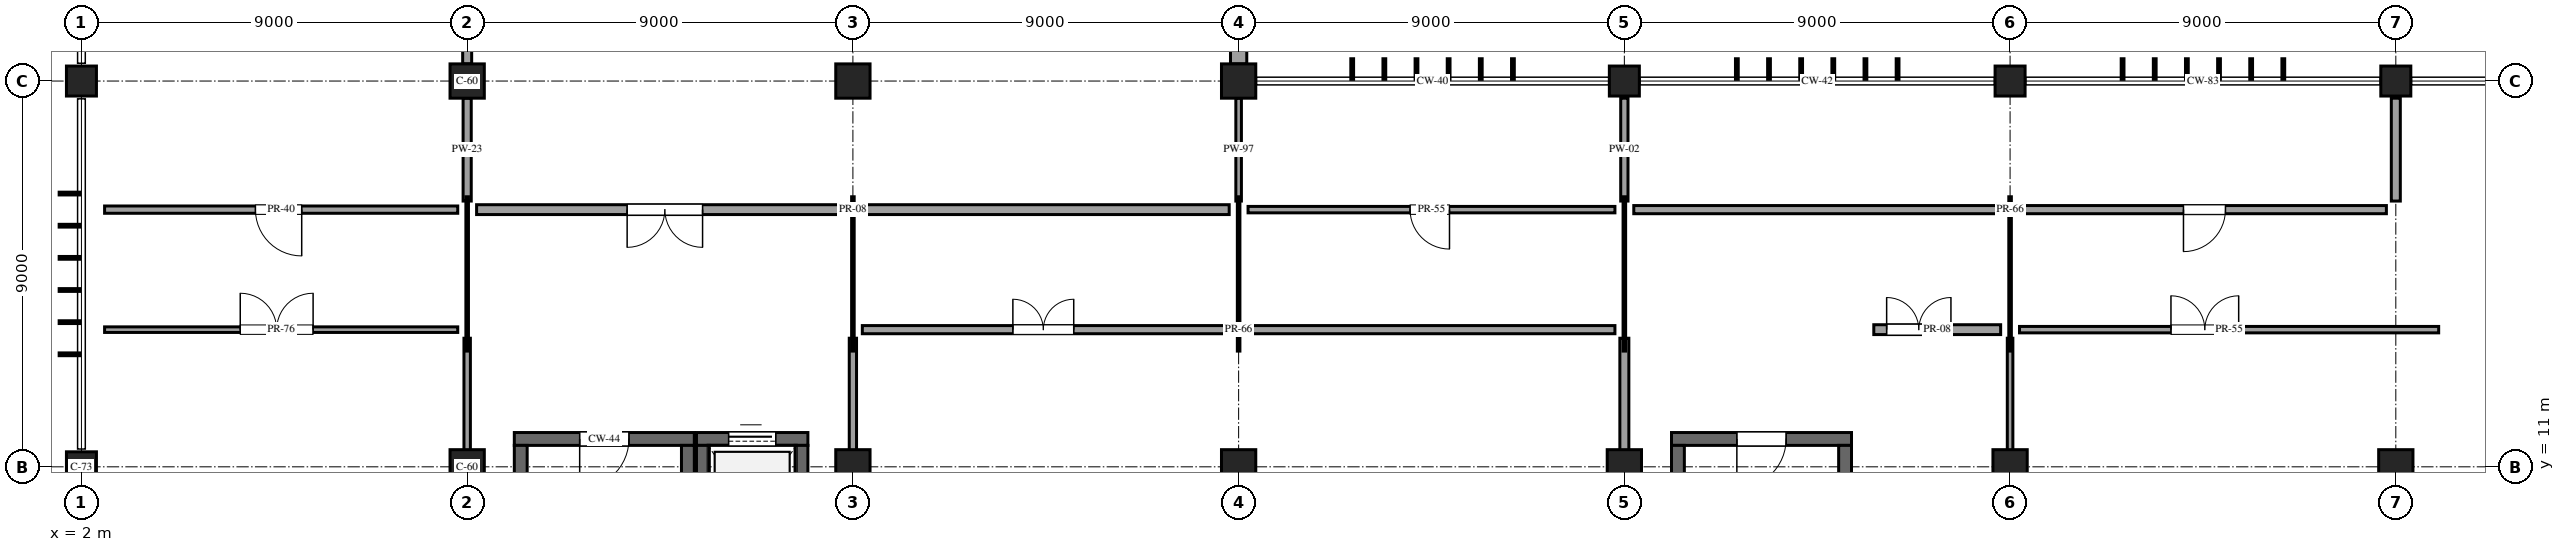
"""IFC4 building model, lengths in metres.
Left out: names, types, materials, properties, quantities, classifications, styles, units other than length and angle.
Written with IfcOpenShell. Run it as: python <this file> out.ifc"""

import sys

from ifc_helpers import new_model, si_unit, direction, frame, frame_2d, origin, origin_2d, place, context, subcontext, project, spatial, rectangle, circle, extrude, element, fill, save


model = new_model("IFC4")
c1 = context("Model", 3, precision=1e-05, world=origin(), true_north=direction((0.0, 1.0)))
c2 = subcontext(c1, "Body", "Model", "MODEL_VIEW")
j1 = project(units=[si_unit("LENGTHUNIT", "METRE"), si_unit("PLANEANGLEUNIT", "RADIAN")], contexts=[c1])
p1 = place(None, origin())
s1 = spatial("IfcSite", under=j1, at=p1, CompositionType="ELEMENT")
p2 = place(p1, origin())
s2 = spatial("IfcBuilding", under=s1, at=p2, CompositionType="ELEMENT")
p3 = place(p2, frame((0.0, 0.0, 5.4)))
s3 = spatial("IfcBuildingStorey", under=s2, at=p3, CompositionType="ELEMENT", Elevation=5.4)
for number, where, z_axis, x_axis in (
    (1, (2.0, 11.0, 0.0), (0.0, 0.0, 1.0), (1.0, 0.0, 0.0)),
    (2, (2.0, 20.0, 0.0), (0.0, 0.0, 1.0), (1.0, 0.0, 0.0)),
):
    element("IfcColumn", number, at=place(p3, frame(where, z_axis=z_axis, x_axis=x_axis)), inside=s3, PredefinedType="COLUMN", context=c2, shape_type="SweptSolid", body=[
        extrude(rectangle(XDim=0.7, YDim=0.7, at=origin_2d()), origin(), (0.0, 0.0, 1.0), 4.8),
    ])
for number, where, z_axis, x_axis in (
    (3, (11.0, 11.0, 0.0), (0.0, 0.0, 1.0), (1.0, 0.0, 0.0)),
    (4, (11.0, 20.0, 0.0), (0.0, 0.0, 1.0), (1.0, 0.0, 0.0)),
    (5, (20.0, 11.0, 0.0), (0.0, 0.0, 1.0), (1.0, 0.0, 0.0)),
    (6, (20.0, 20.0, 0.0), (0.0, 0.0, 1.0), (1.0, 0.0, 0.0)),
    (7, (29.0, 11.0, 0.0), (0.0, 0.0, 1.0), (1.0, 0.0, 0.0)),
    (8, (29.0, 20.0, 0.0), (0.0, 0.0, 1.0), (1.0, 0.0, 0.0)),
    (9, (38.0, 11.0, 0.0), (0.0, 0.0, 1.0), (1.0, 0.0, 0.0)),
):
    element("IfcColumn", number, at=place(p3, frame(where, z_axis=z_axis, x_axis=x_axis)), inside=s3, PredefinedType="COLUMN", context=c2, shape_type="SweptSolid", body=[
        extrude(circle(Radius=0.4, at=origin_2d()), origin(), (0.0, 0.0, 1.0), 4.8),
    ])
p4 = place(p3, frame((38.0, 20.0, 0.0), z_axis=(0.0, 0.0, 1.0), x_axis=(1.0, 0.0, 0.0)))
e10 = element("IfcColumn", 10, at=p4, inside=s3, PredefinedType="COLUMN", context=c2, shape_type="SweptSolid", body=[
    extrude(rectangle(XDim=0.7, YDim=0.7, at=origin_2d()), origin(), (0.0, 0.0, 1.0), 4.8),
])
p5 = place(p3, frame((47.0, 11.0, 0.0), z_axis=(0.0, 0.0, 1.0), x_axis=(1.0, 0.0, 0.0)))
e11 = element("IfcColumn", 11, at=p5, inside=s3, PredefinedType="COLUMN", context=c2, shape_type="SweptSolid", body=[
    extrude(circle(Radius=0.4, at=origin_2d()), origin(), (0.0, 0.0, 1.0), 4.8),
])
p6 = place(p3, frame((47.0, 20.0, 0.0), z_axis=(0.0, 0.0, 1.0), x_axis=(1.0, 0.0, 0.0)))
e12 = element("IfcColumn", 12, at=p6, inside=s3, PredefinedType="COLUMN", context=c2, shape_type="SweptSolid", body=[
    extrude(rectangle(XDim=0.7, YDim=0.7, at=origin_2d()), origin(), (0.0, 0.0, 1.0), 4.8),
])
p7 = place(p3, frame((56.0, 11.0, 0.0), z_axis=(0.0, 0.0, 1.0), x_axis=(1.0, 0.0, 0.0)))
e13 = element("IfcColumn", 13, at=p7, inside=s3, PredefinedType="COLUMN", context=c2, shape_type="SweptSolid", body=[
    extrude(circle(Radius=0.4, at=origin_2d()), origin(), (0.0, 0.0, 1.0), 4.8),
])
p8 = place(p3, frame((56.0, 20.0, 0.0), z_axis=(0.0, 0.0, 1.0), x_axis=(1.0, 0.0, 0.0)))
e14 = element("IfcColumn", 14, at=p8, inside=s3, PredefinedType="COLUMN", context=c2, shape_type="SweptSolid", body=[
    extrude(rectangle(XDim=0.7, YDim=0.7, at=origin_2d()), origin(), (0.0, 0.0, 1.0), 4.8),
])
p9 = place(p3, frame((29.0, 20.4, 0.0), z_axis=(0.0, 0.0, 1.0), x_axis=(0.0, 1.0, 0.0)))
e15 = element("IfcWall", 15, at=p9, inside=s3, PredefinedType="STANDARD", context=c2, shape_type="SweptSolid", body=[
    extrude(rectangle(XDim=8.45, YDim=0.38, at=frame_2d((4.225, 0.0))), origin(), (0.0, 0.0, 1.0), 3.575),
])
p10 = place(p3, frame((12.1, 11.65, 0.0), z_axis=(0.0, 0.0, 1.0), x_axis=(1.0, 0.0, 0.0)))
e16 = element("IfcWall", 16, at=p10, inside=s3, PredefinedType="SHEAR", context=c2, shape_type="SweptSolid", body=[
    extrude(rectangle(XDim=4.2, YDim=0.3, at=frame_2d((2.1, 0.0))), origin(), (0.0, 0.0, 1.0), 4.44),
])
p11 = place(p10, frame((2.675, 0.0, 0.0), z_axis=(0.0, 0.0, 1.0), x_axis=(-1.0, 0.0, 0.0)))
e17 = element("IfcOpeningElement", 17, at=p11, cuts=e16, PredefinedType="OPENING", context=c2, shape_type="SweptSolid", body=[
    extrude(rectangle(XDim=1.15, YDim=2.2, at=frame_2d((0.575, 1.1))), frame((0.0, 0.16, 0.0), z_axis=(0.0, -1.0, 0.0), x_axis=(1.0, 0.0, 0.0)), (0.0, 0.0, 1.0), 0.32),
])
for number, where, z_axis, x_axis in (
    (18, (12.25, 2.85, 0.0), (0.0, 0.0, 1.0), (0.0, 1.0, 0.0)),
    (19, (16.15, 2.85, 0.0), (0.0, 0.0, 1.0), (0.0, 1.0, 0.0)),
):
    element("IfcWall", number, at=place(p3, frame(where, z_axis=z_axis, x_axis=x_axis)), inside=s3, PredefinedType="SHEAR", context=c2, shape_type="SweptSolid", body=[
        extrude(rectangle(XDim=8.65, YDim=0.3, at=frame_2d((4.325, 0.0))), origin(), (0.0, 0.0, 1.0), 4.44),
    ])
p12 = place(p3, frame((16.35, 11.65, 0.0), z_axis=(0.0, 0.0, 1.0), x_axis=(1.0, 0.0, 0.0)))
e20 = element("IfcWall", 20, at=p12, inside=s3, PredefinedType="SHEAR", context=c2, shape_type="SweptSolid", body=[
    extrude(rectangle(XDim=2.6, YDim=0.3, at=frame_2d((1.3, 0.0))), origin(), (0.0, 0.0, 1.0), 4.44),
])
p13 = place(p12, frame((0.75, 0.0, 0.0)))
e21 = element("IfcOpeningElement", 21, at=p13, cuts=e20, PredefinedType="OPENING", context=c2, shape_type="SweptSolid", body=[
    extrude(rectangle(XDim=1.1, YDim=2.2, at=frame_2d((0.55, 1.1))), frame((0.0, 0.16, 0.0), z_axis=(0.0, -1.0, 0.0), x_axis=(1.0, 0.0, 0.0)), (0.0, 0.0, 1.0), 0.32),
])
for number, where, z_axis, x_axis in (
    (22, (18.8, 8.5, 0.0), (0.0, 0.0, 1.0), (0.0, 1.0, 0.0)),
    (23, (16.5, 8.5, 0.0), (0.0, 0.0, 1.0), (0.0, 1.0, 0.0)),
):
    element("IfcWall", number, at=place(p3, frame(where, z_axis=z_axis, x_axis=x_axis)), inside=s3, PredefinedType="SHEAR", context=c2, shape_type="SweptSolid", body=[
        extrude(rectangle(XDim=3.0, YDim=0.3, at=frame_2d((1.5, 0.0))), origin(), (0.0, 0.0, 1.0), 4.44),
    ])
p14 = place(p3, frame((39.1, 11.65, 0.0), z_axis=(0.0, 0.0, 1.0), x_axis=(1.0, 0.0, 0.0)))
e24 = element("IfcWall", 24, at=p14, inside=s3, PredefinedType="SHEAR", context=c2, shape_type="SweptSolid", body=[
    extrude(rectangle(XDim=4.2, YDim=0.3, at=frame_2d((2.1, 0.0))), origin(), (0.0, 0.0, 1.0), 4.44),
])
p15 = place(p14, frame((2.675, 0.0, 0.0), z_axis=(0.0, 0.0, 1.0), x_axis=(-1.0, 0.0, 0.0)))
e25 = element("IfcOpeningElement", 25, at=p15, cuts=e24, PredefinedType="OPENING", context=c2, shape_type="SweptSolid", body=[
    extrude(rectangle(XDim=1.15, YDim=2.2, at=frame_2d((0.575, 1.1))), frame((0.0, 0.16, 0.0), z_axis=(0.0, -1.0, 0.0), x_axis=(1.0, 0.0, 0.0)), (0.0, 0.0, 1.0), 0.32),
])
for number, where, z_axis, x_axis in (
    (26, (39.25, 2.85, 0.0), (0.0, 0.0, 1.0), (0.0, 1.0, 0.0)),
    (27, (43.15, 2.85, 0.0), (0.0, 0.0, 1.0), (0.0, 1.0, 0.0)),
):
    element("IfcWall", number, at=place(p3, frame(where, z_axis=z_axis, x_axis=x_axis)), inside=s3, PredefinedType="SHEAR", context=c2, shape_type="SweptSolid", body=[
        extrude(rectangle(XDim=8.65, YDim=0.3, at=frame_2d((4.325, 0.0))), origin(), (0.0, 0.0, 1.0), 4.44),
    ])
p16 = place(p3, frame((2.54, 14.2, 0.0), z_axis=(0.0, 0.0, 1.0), x_axis=(1.0, 0.0, 0.0)))
e28 = element("IfcWall", 28, at=p16, inside=s3, PredefinedType="PARTITIONING", context=c2, shape_type="SweptSolid", body=[
    extrude(rectangle(XDim=8.24, YDim=0.13, at=frame_2d((4.12, 0.0))), origin(), (0.0, 0.0, 1.0), 3.575),
])
p17 = place(p16, frame((3.165, 0.0, 0.0)))
e29 = element("IfcOpeningElement", 29, at=p17, cuts=e28, PredefinedType="OPENING", context=c2, shape_type="SweptSolid", body=[
    extrude(rectangle(XDim=1.7, YDim=2.44, at=frame_2d((0.85, 1.22))), frame((0.0, 0.075, 0.0), z_axis=(0.0, -1.0, 0.0), x_axis=(1.0, 0.0, 0.0)), (0.0, 0.0, 1.0), 0.15),
])
p18 = place(p3, frame((11.0, 2.4, 0.0), z_axis=(0.0, 0.0, 1.0), x_axis=(0.0, 1.0, 0.0)))
e30 = element("IfcWall", 30, at=p18, inside=s3, PredefinedType="PARTITIONING", context=c2, shape_type="SweptSolid", body=[
    extrude(rectangle(XDim=11.6, YDim=0.15, at=frame_2d((5.8, 0.0))), origin(), (0.0, 0.0, 1.0), 3.575),
])
p19 = place(p3, frame((20.0, 2.4, 0.0), z_axis=(0.0, 0.0, 1.0), x_axis=(0.0, 1.0, 0.0)))
e31 = element("IfcWall", 31, at=p19, inside=s3, PredefinedType="PARTITIONING", context=c2, shape_type="SweptSolid", body=[
    extrude(rectangle(XDim=11.6, YDim=0.17, at=frame_2d((5.8, 0.0))), origin(), (0.0, 0.0, 1.0), 3.575),
])
p20 = place(p3, frame((20.22, 14.2, 0.0), z_axis=(0.0, 0.0, 1.0), x_axis=(1.0, 0.0, 0.0)))
e32 = element("IfcWall", 32, at=p20, inside=s3, PredefinedType="PARTITIONING", context=c2, shape_type="SweptSolid", body=[
    extrude(rectangle(XDim=17.56, YDim=0.19, at=frame_2d((8.78, 0.0))), origin(), (0.0, 0.0, 1.0), 3.575),
])
p21 = place(p20, frame((3.512, 0.0, 0.0)))
e33 = element("IfcOpeningElement", 33, at=p21, cuts=e32, PredefinedType="OPENING", context=c2, shape_type="SweptSolid", body=[
    extrude(rectangle(XDim=1.42, YDim=2.3, at=frame_2d((0.71, 1.15))), frame((0.0, 0.105, 0.0), z_axis=(0.0, -1.0, 0.0), x_axis=(1.0, 0.0, 0.0)), (0.0, 0.0, 1.0), 0.21),
])
p22 = place(p3, frame((38.0, 2.4, 0.0), z_axis=(0.0, 0.0, 1.0), x_axis=(0.0, 1.0, 0.0)))
e34 = element("IfcWall", 34, at=p22, inside=s3, PredefinedType="PARTITIONING", context=c2, shape_type="SweptSolid", body=[
    extrude(rectangle(XDim=11.6, YDim=0.21, at=frame_2d((5.8, 0.0))), origin(), (0.0, 0.0, 1.0), 3.575),
])
p23 = place(p3, frame((43.82, 14.2, 0.0), z_axis=(0.0, 0.0, 1.0), x_axis=(1.0, 0.0, 0.0)))
e35 = element("IfcWall", 35, at=p23, inside=s3, PredefinedType="PARTITIONING", context=c2, shape_type="SweptSolid", body=[
    extrude(rectangle(XDim=2.96, YDim=0.23, at=frame_2d((1.48, 0.0))), origin(), (0.0, 0.0, 1.0), 3.575),
])
p24 = place(p23, frame((0.3, 0.0, 0.0)))
e36 = element("IfcOpeningElement", 36, at=p24, cuts=e35, PredefinedType="OPENING", context=c2, shape_type="SweptSolid", body=[
    extrude(rectangle(XDim=1.5, YDim=2.35, at=frame_2d((0.75, 1.175))), frame((0.0, 0.125, 0.0), z_axis=(0.0, -1.0, 0.0), x_axis=(1.0, 0.0, 0.0)), (0.0, 0.0, 1.0), 0.25),
])
p25 = place(p3, frame((47.0, 2.4, 0.0), z_axis=(0.0, 0.0, 1.0), x_axis=(0.0, 1.0, 0.0)))
e37 = element("IfcWall", 37, at=p25, inside=s3, PredefinedType="PARTITIONING", context=c2, shape_type="SweptSolid", body=[
    extrude(rectangle(XDim=11.6, YDim=0.13, at=frame_2d((5.8, 0.0))), origin(), (0.0, 0.0, 1.0), 3.575),
])
p26 = place(p3, frame((47.22, 14.2, 0.0), z_axis=(0.0, 0.0, 1.0), x_axis=(1.0, 0.0, 0.0)))
e38 = element("IfcWall", 38, at=p26, inside=s3, PredefinedType="PARTITIONING", context=c2, shape_type="SweptSolid", body=[
    extrude(rectangle(XDim=9.78, YDim=0.15, at=frame_2d((4.89, 0.0))), origin(), (0.0, 0.0, 1.0), 3.175),
])
p27 = place(p26, frame((3.534, 0.0, 0.0)))
e39 = element("IfcOpeningElement", 39, at=p27, cuts=e38, PredefinedType="OPENING", context=c2, shape_type="SweptSolid", body=[
    extrude(rectangle(XDim=1.58, YDim=2.38, at=frame_2d((0.79, 1.19))), frame((0.0, 0.085, 0.0), z_axis=(0.0, -1.0, 0.0), x_axis=(1.0, 0.0, 0.0)), (0.0, 0.0, 1.0), 0.17),
])
p28 = place(p3, frame((2.54, 17.0, 0.0), z_axis=(0.0, 0.0, 1.0), x_axis=(1.0, 0.0, 0.0)))
e40 = element("IfcWall", 40, at=p28, inside=s3, PredefinedType="PARTITIONING", context=c2, shape_type="SweptSolid", body=[
    extrude(rectangle(XDim=8.24, YDim=0.17, at=frame_2d((4.12, 0.0))), origin(), (0.0, 0.0, 1.0), 3.575),
])
p29 = place(p28, frame((4.599, 0.0, 0.0), z_axis=(0.0, 0.0, 1.0), x_axis=(-1.0, 0.0, 0.0)))
e41 = element("IfcOpeningElement", 41, at=p29, cuts=e40, PredefinedType="OPENING", context=c2, shape_type="SweptSolid", body=[
    extrude(rectangle(XDim=1.08, YDim=2.24, at=frame_2d((0.54, 1.12))), frame((0.0, 0.095, 0.0), z_axis=(0.0, -1.0, 0.0), x_axis=(1.0, 0.0, 0.0)), (0.0, 0.0, 1.0), 0.19),
])
p30 = place(p3, frame((11.0, 17.2, 0.0), z_axis=(0.0, 0.0, 1.0), x_axis=(0.0, 1.0, 0.0)))
e42 = element("IfcWall", 42, at=p30, inside=s3, PredefinedType="PARTITIONING", context=c2, shape_type="SweptSolid", body=[
    extrude(rectangle(XDim=2.4, YDim=0.19, at=frame_2d((1.2, 0.0))), origin(), (0.0, 0.0, 1.0), 3.575),
])
p31 = place(p3, frame((11.0, 20.4, 0.0), z_axis=(0.0, 0.0, 1.0), x_axis=(0.0, 1.0, 0.0)))
e43 = element("IfcWall", 43, at=p31, inside=s3, PredefinedType="PARTITIONING", context=c2, shape_type="SweptSolid", body=[
    extrude(rectangle(XDim=8.4, YDim=0.21, at=frame_2d((4.2, 0.0))), origin(), (0.0, 0.0, 1.0), 3.575),
])
p32 = place(p3, frame((11.22, 17.0, 0.0), z_axis=(0.0, 0.0, 1.0), x_axis=(1.0, 0.0, 0.0)))
e44 = element("IfcWall", 44, at=p32, inside=s3, PredefinedType="PARTITIONING", context=c2, shape_type="SweptSolid", body=[
    extrude(rectangle(XDim=17.56, YDim=0.23, at=frame_2d((8.78, 0.0))), origin(), (0.0, 0.0, 1.0), 3.575),
])
p33 = place(p32, frame((5.272, 0.0, 0.0), z_axis=(0.0, 0.0, 1.0), x_axis=(-1.0, 0.0, 0.0)))
e45 = element("IfcOpeningElement", 45, at=p33, cuts=e44, PredefinedType="OPENING", context=c2, shape_type="SweptSolid", body=[
    extrude(rectangle(XDim=1.76, YDim=2.45, at=frame_2d((0.88, 1.225))), frame((0.0, 0.125, 0.0), z_axis=(0.0, -1.0, 0.0), x_axis=(1.0, 0.0, 0.0)), (0.0, 0.0, 1.0), 0.25),
])
p34 = place(p3, frame((29.0, 17.2, 0.0), z_axis=(0.0, 0.0, 1.0), x_axis=(0.0, 1.0, 0.0)))
e46 = element("IfcWall", 46, at=p34, inside=s3, PredefinedType="PARTITIONING", context=c2, shape_type="SweptSolid", body=[
    extrude(rectangle(XDim=2.4, YDim=0.13, at=frame_2d((1.2, 0.0))), origin(), (0.0, 0.0, 1.0), 3.575),
])
p35 = place(p3, frame((29.22, 17.0, 0.0), z_axis=(0.0, 0.0, 1.0), x_axis=(1.0, 0.0, 0.0)))
e47 = element("IfcWall", 47, at=p35, inside=s3, PredefinedType="PARTITIONING", context=c2, shape_type="SweptSolid", body=[
    extrude(rectangle(XDim=8.56, YDim=0.15, at=frame_2d((4.28, 0.0))), origin(), (0.0, 0.0, 1.0), 3.575),
])
p36 = place(p35, frame((4.7, 0.0, 0.0), z_axis=(0.0, 0.0, 1.0), x_axis=(-1.0, 0.0, 0.0)))
e48 = element("IfcOpeningElement", 48, at=p36, cuts=e47, PredefinedType="OPENING", context=c2, shape_type="SweptSolid", body=[
    extrude(rectangle(XDim=0.92, YDim=2.12, at=frame_2d((0.46, 1.06))), frame((0.0, 0.085, 0.0), z_axis=(0.0, -1.0, 0.0), x_axis=(1.0, 0.0, 0.0)), (0.0, 0.0, 1.0), 0.17),
])
p37 = place(p3, frame((38.0, 17.2, 0.0), z_axis=(0.0, 0.0, 1.0), x_axis=(0.0, 1.0, 0.0)))
e49 = element("IfcWall", 49, at=p37, inside=s3, PredefinedType="PARTITIONING", context=c2, shape_type="SweptSolid", body=[
    extrude(rectangle(XDim=2.4, YDim=0.17, at=frame_2d((1.2, 0.0))), origin(), (0.0, 0.0, 1.0), 3.575),
])
p38 = place(p3, frame((38.22, 17.0, 0.0), z_axis=(0.0, 0.0, 1.0), x_axis=(1.0, 0.0, 0.0)))
e50 = element("IfcWall", 50, at=p38, inside=s3, PredefinedType="PARTITIONING", context=c2, shape_type="SweptSolid", body=[
    extrude(rectangle(XDim=17.56, YDim=0.19, at=frame_2d((8.78, 0.0))), origin(), (0.0, 0.0, 1.0), 3.175),
])
p39 = place(p38, frame((13.806, 0.0, 0.0), z_axis=(0.0, 0.0, 1.0), x_axis=(-1.0, 0.0, 0.0)))
e51 = element("IfcOpeningElement", 51, at=p39, cuts=e50, PredefinedType="OPENING", context=c2, shape_type="SweptSolid", body=[
    extrude(rectangle(XDim=0.98, YDim=2.18, at=frame_2d((0.49, 1.09))), frame((0.0, 0.105, 0.0), z_axis=(0.0, -1.0, 0.0), x_axis=(1.0, 0.0, 0.0)), (0.0, 0.0, 1.0), 0.21),
])
p40 = place(p3, frame((56.0, 17.2, 0.0), z_axis=(0.0, 0.0, 1.0), x_axis=(0.0, 1.0, 0.0)))
e52 = element("IfcWall", 52, at=p40, inside=s3, PredefinedType="PARTITIONING", context=c2, shape_type="SweptSolid", body=[
    extrude(rectangle(XDim=2.4, YDim=0.21, at=frame_2d((1.2, 0.0))), origin(), (0.0, 0.0, 1.0), 3.175),
])
p41 = place(p11, origin())
e53 = element("IfcDoor", 53, at=p41, inside=s3, OperationType="SINGLE_SWING_RIGHT", PredefinedType="DOOR", context=c2, shape_type="SweptSolid", body=[
    extrude(rectangle(XDim=1.15, YDim=2.2, at=frame_2d((0.575, 1.1))), frame((0.0, 0.025, 0.0), z_axis=(0.0, -1.0, 0.0), x_axis=(1.0, 0.0, 0.0)), (0.0, 0.0, 1.0), 0.05),
])
fill(e17, e53)
p42 = place(p13, origin())
e54 = element("IfcDoor", 54, at=p42, inside=s3, OperationType="SLIDING_TO_LEFT", PredefinedType="DOOR", context=c2, shape_type="SweptSolid", body=[
    extrude(rectangle(XDim=1.1, YDim=2.2, at=frame_2d((0.55, 1.1))), frame((0.0, 0.025, 0.0), z_axis=(0.0, -1.0, 0.0), x_axis=(1.0, 0.0, 0.0)), (0.0, 0.0, 1.0), 0.05),
])
fill(e21, e54)
p43 = place(p15, origin())
e55 = element("IfcDoor", 55, at=p43, inside=s3, OperationType="SINGLE_SWING_RIGHT", PredefinedType="DOOR", context=c2, shape_type="SweptSolid", body=[
    extrude(rectangle(XDim=1.15, YDim=2.2, at=frame_2d((0.575, 1.1))), frame((0.0, 0.025, 0.0), z_axis=(0.0, -1.0, 0.0), x_axis=(1.0, 0.0, 0.0)), (0.0, 0.0, 1.0), 0.05),
])
fill(e25, e55)
p44 = place(p17, origin())
e56 = element("IfcDoor", 56, at=p44, inside=s3, OperationType="DOUBLE_DOOR_SINGLE_SWING", PredefinedType="DOOR", context=c2, shape_type="SweptSolid", body=[
    extrude(rectangle(XDim=1.7, YDim=2.44, at=frame_2d((0.85, 1.22))), frame((0.0, 0.025, 0.0), z_axis=(0.0, -1.0, 0.0), x_axis=(1.0, 0.0, 0.0)), (0.0, 0.0, 1.0), 0.05),
])
fill(e29, e56)
p45 = place(p21, origin())
e57 = element("IfcDoor", 57, at=p45, inside=s3, OperationType="DOUBLE_DOOR_SINGLE_SWING", PredefinedType="DOOR", context=c2, shape_type="SweptSolid", body=[
    extrude(rectangle(XDim=1.42, YDim=2.3, at=frame_2d((0.71, 1.15))), frame((0.0, 0.025, 0.0), z_axis=(0.0, -1.0, 0.0), x_axis=(1.0, 0.0, 0.0)), (0.0, 0.0, 1.0), 0.05),
])
fill(e33, e57)
p46 = place(p24, origin())
e58 = element("IfcDoor", 58, at=p46, inside=s3, OperationType="DOUBLE_DOOR_SINGLE_SWING", PredefinedType="DOOR", context=c2, shape_type="SweptSolid", body=[
    extrude(rectangle(XDim=1.5, YDim=2.35, at=frame_2d((0.75, 1.175))), frame((0.0, 0.025, 0.0), z_axis=(0.0, -1.0, 0.0), x_axis=(1.0, 0.0, 0.0)), (0.0, 0.0, 1.0), 0.05),
])
fill(e36, e58)
p47 = place(p27, origin())
e59 = element("IfcDoor", 59, at=p47, inside=s3, OperationType="DOUBLE_DOOR_SINGLE_SWING", PredefinedType="DOOR", context=c2, shape_type="SweptSolid", body=[
    extrude(rectangle(XDim=1.58, YDim=2.38, at=frame_2d((0.79, 1.19))), frame((0.0, 0.025, 0.0), z_axis=(0.0, -1.0, 0.0), x_axis=(1.0, 0.0, 0.0)), (0.0, 0.0, 1.0), 0.05),
])
fill(e39, e59)
p48 = place(p29, origin())
e60 = element("IfcDoor", 60, at=p48, inside=s3, OperationType="SINGLE_SWING_LEFT", PredefinedType="DOOR", context=c2, shape_type="SweptSolid", body=[
    extrude(rectangle(XDim=1.08, YDim=2.24, at=frame_2d((0.54, 1.12))), frame((0.0, 0.025, 0.0), z_axis=(0.0, -1.0, 0.0), x_axis=(1.0, 0.0, 0.0)), (0.0, 0.0, 1.0), 0.05),
])
fill(e41, e60)
p49 = place(p33, origin())
e61 = element("IfcDoor", 61, at=p49, inside=s3, OperationType="DOUBLE_DOOR_SINGLE_SWING", PredefinedType="DOOR", context=c2, shape_type="SweptSolid", body=[
    extrude(rectangle(XDim=1.76, YDim=2.45, at=frame_2d((0.88, 1.225))), frame((0.0, 0.025, 0.0), z_axis=(0.0, -1.0, 0.0), x_axis=(1.0, 0.0, 0.0)), (0.0, 0.0, 1.0), 0.05),
])
fill(e45, e61)
p50 = place(p36, origin())
e62 = element("IfcDoor", 62, at=p50, inside=s3, OperationType="SINGLE_SWING_LEFT", PredefinedType="DOOR", context=c2, shape_type="SweptSolid", body=[
    extrude(rectangle(XDim=0.92, YDim=2.12, at=frame_2d((0.46, 1.06))), frame((0.0, 0.025, 0.0), z_axis=(0.0, -1.0, 0.0), x_axis=(1.0, 0.0, 0.0)), (0.0, 0.0, 1.0), 0.05),
])
fill(e48, e62)
p51 = place(p39, origin())
e63 = element("IfcDoor", 63, at=p51, inside=s3, OperationType="SINGLE_SWING_RIGHT", PredefinedType="DOOR", context=c2, shape_type="SweptSolid", body=[
    extrude(rectangle(XDim=0.98, YDim=2.18, at=frame_2d((0.49, 1.09))), frame((0.0, 0.025, 0.0), z_axis=(0.0, -1.0, 0.0), x_axis=(1.0, 0.0, 0.0)), (0.0, 0.0, 1.0), 0.05),
])
fill(e51, e63)
save(model, sys.argv[1])
